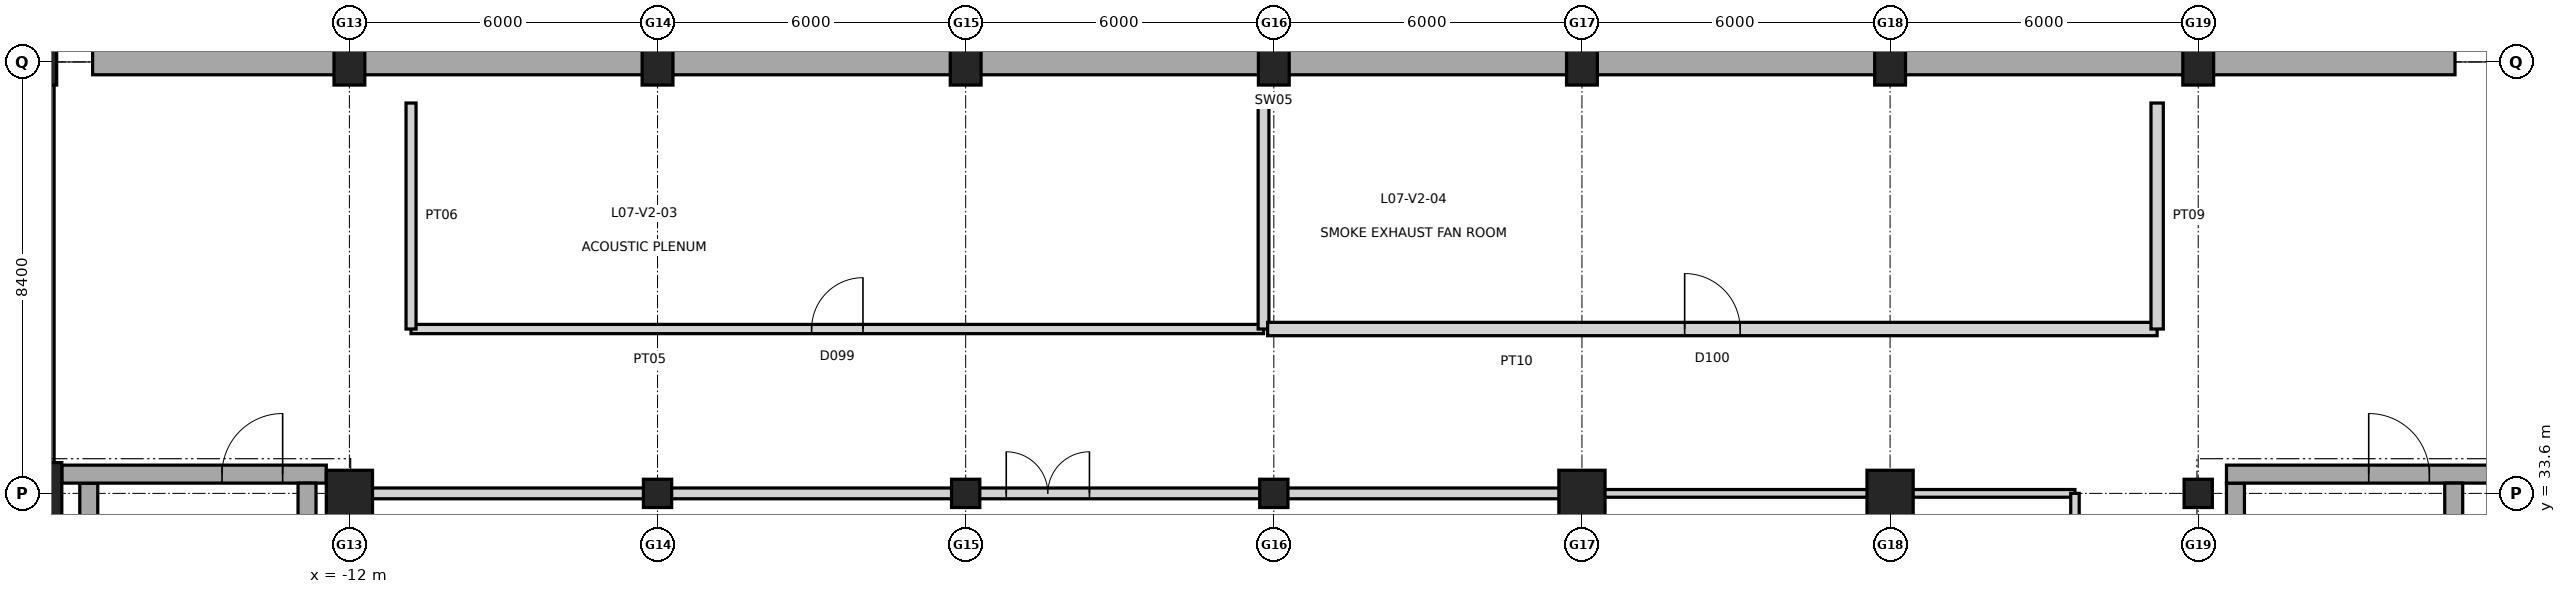
"""IFC4 building model, lengths in metres.
Left out: names, types, materials, properties, quantities, classifications, styles, units other than length and angle.
Written with IfcOpenShell. Run it as: python <this file> out.ifc"""

import sys

from ifc_helpers import new_model, si_unit, direction, frame, frame_2d, origin, origin_2d, place, context, subcontext, project, spatial, rectangle, extrude, element, fill, save


model = new_model("IFC4")
c1 = context("Model", 3, precision=1e-05, world=origin(), true_north=direction((0.0, 1.0)))
c2 = subcontext(c1, "Body", "Model", "MODEL_VIEW")
j1 = project(units=[si_unit("LENGTHUNIT", "METRE"), si_unit("PLANEANGLEUNIT", "RADIAN")], contexts=[c1])
p1 = place(None, origin())
s1 = spatial("IfcSite", under=j1, at=p1, CompositionType="ELEMENT")
p2 = place(p1, origin())
s2 = spatial("IfcBuilding", under=s1, at=p2, CompositionType="ELEMENT")
p3 = place(p2, frame((0.0, 0.0, 36.0)))
s3 = spatial("IfcBuildingStorey", under=s2, at=p3, CompositionType="ELEMENT", Elevation=36.0)
p4 = place(p3, frame((-18.0, 33.6, 0.0), z_axis=(0.0, 0.0, 1.0), x_axis=(1.0, 0.0, 0.0)))
e1 = element("IfcColumn", 1, at=p4, inside=s3, PredefinedType="COLUMN", context=c2, shape_type="SweptSolid", body=[
    extrude(rectangle(XDim=0.8, YDim=1.2, at=origin_2d()), origin(), (0.0, 0.0, 1.0), 5.4),
])
p5 = place(p3, frame((-18.0, 42.0, 0.0), z_axis=(0.0, 0.0, 1.0), x_axis=(1.0, 0.0, 0.0)))
e2 = element("IfcColumn", 2, at=p5, inside=s3, PredefinedType="COLUMN", context=c2, shape_type="SweptSolid", body=[
    extrude(rectangle(XDim=0.6, YDim=0.9, at=origin_2d()), origin(), (0.0, 0.0, 1.0), 5.4),
])
p6 = place(p3, frame((-12.0, 33.6, 0.0), z_axis=(0.0, 0.0, 1.0), x_axis=(1.0, 0.0, 0.0)))
e3 = element("IfcColumn", 3, at=p6, inside=s3, PredefinedType="COLUMN", context=c2, shape_type="SweptSolid", body=[
    extrude(rectangle(XDim=0.9, YDim=0.9, at=origin_2d()), origin(), (0.0, 0.0, 1.0), 5.4),
])
p7 = place(p3, frame((-12.0, 42.0, 0.0), z_axis=(0.0, 0.0, 1.0), x_axis=(1.0, 0.0, 0.0)))
e4 = element("IfcColumn", 4, at=p7, inside=s3, PredefinedType="COLUMN", context=c2, shape_type="SweptSolid", body=[
    extrude(rectangle(XDim=0.6, YDim=0.9, at=origin_2d()), origin(), (0.0, 0.0, 1.0), 5.4),
])
p8 = place(p3, frame((-6.0, 33.6, 0.0), z_axis=(0.0, 0.0, 1.0), x_axis=(1.0, 0.0, 0.0)))
e5 = element("IfcColumn", 5, at=p8, inside=s3, PredefinedType="COLUMN", context=c2, shape_type="SweptSolid", body=[
    extrude(rectangle(XDim=0.55, YDim=0.55, at=origin_2d()), origin(), (0.0, 0.0, 1.0), 5.4),
])
p9 = place(p3, frame((-6.0, 42.0, 0.0), z_axis=(0.0, 0.0, 1.0), x_axis=(1.0, 0.0, 0.0)))
e6 = element("IfcColumn", 6, at=p9, inside=s3, PredefinedType="COLUMN", context=c2, shape_type="SweptSolid", body=[
    extrude(rectangle(XDim=0.6, YDim=0.9, at=origin_2d()), origin(), (0.0, 0.0, 1.0), 5.4),
])
p10 = place(p3, frame((0.0, 33.6, 0.0), z_axis=(0.0, 0.0, 1.0), x_axis=(1.0, 0.0, 0.0)))
e7 = element("IfcColumn", 7, at=p10, inside=s3, PredefinedType="COLUMN", context=c2, shape_type="SweptSolid", body=[
    extrude(rectangle(XDim=0.55, YDim=0.55, at=origin_2d()), origin(), (0.0, 0.0, 1.0), 5.4),
])
p11 = place(p3, frame((0.0, 42.0, 0.0), z_axis=(0.0, 0.0, 1.0), x_axis=(1.0, 0.0, 0.0)))
e8 = element("IfcColumn", 8, at=p11, inside=s3, PredefinedType="COLUMN", context=c2, shape_type="SweptSolid", body=[
    extrude(rectangle(XDim=0.6, YDim=0.9, at=origin_2d()), origin(), (0.0, 0.0, 1.0), 5.4),
])
p12 = place(p3, frame((6.0, 33.6, 0.0), z_axis=(0.0, 0.0, 1.0), x_axis=(1.0, 0.0, 0.0)))
e9 = element("IfcColumn", 9, at=p12, inside=s3, PredefinedType="COLUMN", context=c2, shape_type="SweptSolid", body=[
    extrude(rectangle(XDim=0.55, YDim=0.55, at=origin_2d()), origin(), (0.0, 0.0, 1.0), 5.4),
])
p13 = place(p3, frame((6.0, 42.0, 0.0), z_axis=(0.0, 0.0, 1.0), x_axis=(1.0, 0.0, 0.0)))
e10 = element("IfcColumn", 10, at=p13, inside=s3, PredefinedType="COLUMN", context=c2, shape_type="SweptSolid", body=[
    extrude(rectangle(XDim=0.6, YDim=0.9, at=origin_2d()), origin(), (0.0, 0.0, 1.0), 5.4),
])
p14 = place(p3, frame((12.0, 33.6, 0.0), z_axis=(0.0, 0.0, 1.0), x_axis=(1.0, 0.0, 0.0)))
e11 = element("IfcColumn", 11, at=p14, inside=s3, PredefinedType="COLUMN", context=c2, shape_type="SweptSolid", body=[
    extrude(rectangle(XDim=0.9, YDim=0.9, at=origin_2d()), origin(), (0.0, 0.0, 1.0), 5.4),
])
p15 = place(p3, frame((12.0, 42.0, 0.0), z_axis=(0.0, 0.0, 1.0), x_axis=(1.0, 0.0, 0.0)))
e12 = element("IfcColumn", 12, at=p15, inside=s3, PredefinedType="COLUMN", context=c2, shape_type="SweptSolid", body=[
    extrude(rectangle(XDim=0.6, YDim=0.9, at=origin_2d()), origin(), (0.0, 0.0, 1.0), 5.4),
])
p16 = place(p3, frame((18.0, 33.6, 0.0), z_axis=(0.0, 0.0, 1.0), x_axis=(1.0, 0.0, 0.0)))
e13 = element("IfcColumn", 13, at=p16, inside=s3, PredefinedType="COLUMN", context=c2, shape_type="SweptSolid", body=[
    extrude(rectangle(XDim=0.9, YDim=0.9, at=origin_2d()), origin(), (0.0, 0.0, 1.0), 5.4),
])
p17 = place(p3, frame((18.0, 42.0, 0.0), z_axis=(0.0, 0.0, 1.0), x_axis=(1.0, 0.0, 0.0)))
e14 = element("IfcColumn", 14, at=p17, inside=s3, PredefinedType="COLUMN", context=c2, shape_type="SweptSolid", body=[
    extrude(rectangle(XDim=0.6, YDim=0.9, at=origin_2d()), origin(), (0.0, 0.0, 1.0), 5.4),
])
p18 = place(p3, frame((24.0, 33.6, 0.0), z_axis=(0.0, 0.0, 1.0), x_axis=(1.0, 0.0, 0.0)))
e15 = element("IfcColumn", 15, at=p18, inside=s3, PredefinedType="COLUMN", context=c2, shape_type="SweptSolid", body=[
    extrude(rectangle(XDim=0.55, YDim=0.55, at=origin_2d()), origin(), (0.0, 0.0, 1.0), 5.4),
])
p19 = place(p3, frame((24.0, 42.0, 0.0), z_axis=(0.0, 0.0, 1.0), x_axis=(1.0, 0.0, 0.0)))
e16 = element("IfcColumn", 16, at=p19, inside=s3, PredefinedType="COLUMN", context=c2, shape_type="SweptSolid", body=[
    extrude(rectangle(XDim=0.6, YDim=0.9, at=origin_2d()), origin(), (0.0, 0.0, 1.0), 5.4),
])
p20 = place(p3, frame((-18.0, 18.0, 0.0), z_axis=(0.0, 0.0, 1.0), x_axis=(0.0, 1.0, 0.0)))
e17 = element("IfcWall", 17, at=p20, inside=s3, PredefinedType="SHEAR", context=c2, shape_type="SweptSolid", body=[
    extrude(rectangle(XDim=23.55, YDim=0.5, at=frame_2d((11.775, 0.0))), origin(), (0.0, 0.0, 1.0), 5.4),
])
p21 = place(p3, frame((-17.0, 42.0, 0.0), z_axis=(0.0, 0.0, 1.0), x_axis=(1.0, 0.0, 0.0)))
e18 = element("IfcWall", 18, at=p21, inside=s3, PredefinedType="SHEAR", context=c2, shape_type="SweptSolid", body=[
    extrude(rectangle(XDim=46.0, YDim=0.5, at=frame_2d((23.0, 0.0))), origin(), (0.0, 0.0, 1.0), 5.4),
])
p22 = place(p3, frame((-17.075, 25.5, 0.0), z_axis=(0.0, 0.0, 1.0), x_axis=(0.0, 1.0, 0.0)))
e19 = element("IfcWall", 19, at=p22, inside=s3, PredefinedType="SHEAR", context=c2, shape_type="SweptSolid", body=[
    extrude(rectangle(XDim=8.3, YDim=0.35, at=frame_2d((4.15, 0.0))), origin(), (0.0, 0.0, 1.0), 4.645),
])
p23 = place(p3, frame((-17.6, 33.975, 0.0), z_axis=(0.0, 0.0, 1.0), x_axis=(1.0, 0.0, 0.0)))
e20 = element("IfcWall", 20, at=p23, inside=s3, PredefinedType="SHEAR", context=c2, shape_type="SweptSolid", body=[
    extrude(rectangle(XDim=5.15, YDim=0.35, at=frame_2d((2.575, 0.0))), origin(), (0.0, 0.0, 1.0), 4.645),
])
p24 = place(p23, frame((3.12, 0.0, 0.0)))
e21 = element("IfcOpeningElement", 21, at=p24, cuts=e20, PredefinedType="OPENING", context=c2, shape_type="SweptSolid", body=[
    extrude(rectangle(XDim=1.18, YDim=2.15, at=frame_2d((0.59, 1.075))), frame((0.0, 0.185, 0.0), z_axis=(0.0, -1.0, 0.0), x_axis=(1.0, 0.0, 0.0)), (0.0, 0.0, 1.0), 0.37),
])
for number, where, z_axis, x_axis in (
    (22, (-12.825, 33.8, 0.0), (0.0, 0.0, 1.0), (0.0, -1.0, 0.0)),
    (23, (24.725, 25.5, 0.0), (0.0, 0.0, 1.0), (0.0, 1.0, 0.0)),
):
    element("IfcWall", number, at=place(p3, frame(where, z_axis=z_axis, x_axis=x_axis)), inside=s3, PredefinedType="SHEAR", context=c2, shape_type="SweptSolid", body=[
        extrude(rectangle(XDim=8.3, YDim=0.35, at=frame_2d((4.15, 0.0))), origin(), (0.0, 0.0, 1.0), 4.645),
    ])
p25 = place(p3, frame((24.55, 33.975, 0.0), z_axis=(0.0, 0.0, 1.0), x_axis=(1.0, 0.0, 0.0)))
e24 = element("IfcWall", 24, at=p25, inside=s3, PredefinedType="SHEAR", context=c2, shape_type="SweptSolid", body=[
    extrude(rectangle(XDim=5.15, YDim=0.35, at=frame_2d((2.575, 0.0))), origin(), (0.0, 0.0, 1.0), 4.645),
])
p26 = place(p25, frame((2.77, 0.0, 0.0)))
e25 = element("IfcOpeningElement", 25, at=p26, cuts=e24, PredefinedType="OPENING", context=c2, shape_type="SweptSolid", body=[
    extrude(rectangle(XDim=1.18, YDim=2.15, at=frame_2d((0.59, 1.075))), frame((0.0, 0.185, 0.0), z_axis=(0.0, -1.0, 0.0), x_axis=(1.0, 0.0, 0.0)), (0.0, 0.0, 1.0), 0.37),
])
p27 = place(p3, frame((28.975, 33.8, 0.0), z_axis=(0.0, 0.0, 1.0), x_axis=(0.0, -1.0, 0.0)))
e26 = element("IfcWall", 26, at=p27, inside=s3, PredefinedType="SHEAR", context=c2, shape_type="SweptSolid", body=[
    extrude(rectangle(XDim=8.3, YDim=0.35, at=frame_2d((4.15, 0.0))), origin(), (0.0, 0.0, 1.0), 4.645),
])
p28 = place(p3, frame((-11.8, 33.6, 0.0), z_axis=(0.0, 0.0, 1.0), x_axis=(1.0, 0.0, 0.0)))
e27 = element("IfcWall", 27, at=p28, inside=s3, PredefinedType="PARTITIONING", context=c2, shape_type="SweptSolid", body=[
    extrude(rectangle(XDim=23.6, YDim=0.21, at=frame_2d((11.8, 0.0))), origin(), (0.0, 0.0, 1.0), 5.02),
])
p29 = place(p28, frame((12.59, 0.0, 0.0)))
e28 = element("IfcOpeningElement", 28, at=p29, cuts=e27, PredefinedType="OPENING", context=c2, shape_type="SweptSolid", body=[
    extrude(rectangle(XDim=1.62, YDim=2.2, at=frame_2d((0.81, 1.1))), frame((0.0, 0.115, 0.0), z_axis=(0.0, -1.0, 0.0), x_axis=(1.0, 0.0, 0.0)), (0.0, 0.0, 1.0), 0.23),
])
p30 = place(p3, frame((-11.8, 18.2, 0.0), z_axis=(0.0, 0.0, 1.0), x_axis=(0.0, 1.0, 0.0)))
e29 = element("IfcWall", 29, at=p30, inside=s3, PredefinedType="PARTITIONING", context=c2, shape_type="SweptSolid", body=[
    extrude(rectangle(XDim=15.4, YDim=0.225, at=frame_2d((7.7, 0.0))), origin(), (0.0, 0.0, 1.0), 4.33),
])
p31 = place(p3, frame((11.8, 18.2, 0.0), z_axis=(0.0, 0.0, 1.0), x_axis=(0.0, 1.0, 0.0)))
e30 = element("IfcWall", 30, at=p31, inside=s3, PredefinedType="PARTITIONING", context=c2, shape_type="SweptSolid", body=[
    extrude(rectangle(XDim=15.4, YDim=0.21, at=frame_2d((7.7, 0.0))), origin(), (0.0, 0.0, 1.0), 4.33),
])
p32 = place(p3, frame((12.4, 33.6, 0.0), z_axis=(0.0, 0.0, 1.0), x_axis=(1.0, 0.0, 0.0)))
e31 = element("IfcWall", 31, at=p32, inside=s3, PredefinedType="PARTITIONING", context=c2, shape_type="SweptSolid", body=[
    extrude(rectangle(XDim=9.2, YDim=0.15, at=frame_2d((4.6, 0.0))), origin(), (0.0, 0.0, 1.0), 5.02),
])
p33 = place(p3, frame((21.6, 24.2, 0.0), z_axis=(0.0, 0.0, 1.0), x_axis=(0.0, 1.0, 0.0)))
e32 = element("IfcWall", 32, at=p33, inside=s3, PredefinedType="PARTITIONING", context=c2, shape_type="SweptSolid", body=[
    extrude(rectangle(XDim=9.4, YDim=0.165, at=frame_2d((4.7, 0.0))), origin(), (0.0, 0.0, 1.0), 5.02),
])
p34 = place(p3, frame((-10.8, 36.8, 0.0), z_axis=(0.0, 0.0, 1.0), x_axis=(1.0, 0.0, 0.0)))
e33 = element("IfcWall", 33, at=p34, inside=s3, PredefinedType="PARTITIONING", context=c2, shape_type="SweptSolid", body=[
    extrude(rectangle(XDim=16.6, YDim=0.18, at=frame_2d((8.3, 0.0))), origin(), (0.0, 0.0, 1.0), 5.02),
])
p35 = place(p34, frame((7.8, 0.0, 0.0)))
e34 = element("IfcOpeningElement", 34, at=p35, cuts=e33, PredefinedType="OPENING", context=c2, shape_type="SweptSolid", body=[
    extrude(rectangle(XDim=1.0, YDim=2.25, at=frame_2d((0.5, 1.125))), frame((0.0, 0.1, 0.0), z_axis=(0.0, -1.0, 0.0), x_axis=(1.0, 0.0, 0.0)), (0.0, 0.0, 1.0), 0.2),
])
p36 = place(p3, frame((-10.8, 36.8, 0.0), z_axis=(0.0, 0.0, 1.0), x_axis=(0.0, 1.0, 0.0)))
e35 = element("IfcWall", 35, at=p36, inside=s3, PredefinedType="PARTITIONING", context=c2, shape_type="SweptSolid", body=[
    extrude(rectangle(XDim=4.4, YDim=0.195, at=frame_2d((2.2, 0.0))), origin(), (0.0, 0.0, 1.0), 5.02),
])
p37 = place(p3, frame((5.8, 36.8, 0.0), z_axis=(0.0, 0.0, 1.0), x_axis=(0.0, 1.0, 0.0)))
e36 = element("IfcWall", 36, at=p37, inside=s3, PredefinedType="PARTITIONING", context=c2, shape_type="SweptSolid", body=[
    extrude(rectangle(XDim=4.4, YDim=0.21, at=frame_2d((2.2, 0.0))), origin(), (0.0, 0.0, 1.0), 4.33),
])
p38 = place(p3, frame((5.88, 36.8, 0.0), z_axis=(0.0, 0.0, 1.0), x_axis=(1.0, 0.0, 0.0)))
e37 = element("IfcWall", 37, at=p38, inside=s3, PredefinedType="PARTITIONING", context=c2, shape_type="SweptSolid", body=[
    extrude(rectangle(XDim=17.32, YDim=0.26, at=frame_2d((8.66, 0.0))), origin(), (0.0, 0.0, 1.0), 5.02),
])
p39 = place(p38, frame((8.12, 0.0, 0.0)))
e38 = element("IfcOpeningElement", 38, at=p39, cuts=e37, PredefinedType="OPENING", context=c2, shape_type="SweptSolid", body=[
    extrude(rectangle(XDim=1.08, YDim=2.25, at=frame_2d((0.54, 1.125))), frame((0.0, 0.14, 0.0), z_axis=(0.0, -1.0, 0.0), x_axis=(1.0, 0.0, 0.0)), (0.0, 0.0, 1.0), 0.28),
])
p40 = place(p3, frame((23.2, 36.8, 0.0), z_axis=(0.0, 0.0, 1.0), x_axis=(0.0, 1.0, 0.0)))
e39 = element("IfcWall", 39, at=p40, inside=s3, PredefinedType="PARTITIONING", context=c2, shape_type="SweptSolid", body=[
    extrude(rectangle(XDim=4.4, YDim=0.24, at=frame_2d((2.2, 0.0))), origin(), (0.0, 0.0, 1.0), 5.02),
])
p41 = place(p24, origin())
e40 = element("IfcDoor", 40, at=p41, inside=s3, OperationType="SINGLE_SWING_RIGHT", PredefinedType="DOOR", context=c2, shape_type="SweptSolid", body=[
    extrude(rectangle(XDim=1.18, YDim=2.15, at=frame_2d((0.59, 1.075))), frame((0.0, 0.025, 0.0), z_axis=(0.0, -1.0, 0.0), x_axis=(1.0, 0.0, 0.0)), (0.0, 0.0, 1.0), 0.05),
])
fill(e21, e40)
p42 = place(p26, origin())
e41 = element("IfcDoor", 41, at=p42, inside=s3, OperationType="SINGLE_SWING_LEFT", PredefinedType="DOOR", context=c2, shape_type="SweptSolid", body=[
    extrude(rectangle(XDim=1.18, YDim=2.15, at=frame_2d((0.59, 1.075))), frame((0.0, 0.025, 0.0), z_axis=(0.0, -1.0, 0.0), x_axis=(1.0, 0.0, 0.0)), (0.0, 0.0, 1.0), 0.05),
])
fill(e25, e41)
p43 = place(p29, origin())
e42 = element("IfcDoor", 42, at=p43, inside=s3, OperationType="DOUBLE_DOOR_SINGLE_SWING", PredefinedType="DOOR", context=c2, shape_type="SweptSolid", body=[
    extrude(rectangle(XDim=1.62, YDim=2.2, at=frame_2d((0.81, 1.1))), frame((0.0, 0.025, 0.0), z_axis=(0.0, -1.0, 0.0), x_axis=(1.0, 0.0, 0.0)), (0.0, 0.0, 1.0), 0.05),
])
fill(e28, e42)
p44 = place(p35, origin())
e43 = element("IfcDoor", 43, at=p44, inside=s3, OperationType="SINGLE_SWING_RIGHT", PredefinedType="DOOR", context=c2, shape_type="SweptSolid", body=[
    extrude(rectangle(XDim=1.0, YDim=2.25, at=frame_2d((0.5, 1.125))), frame((0.0, 0.025, 0.0), z_axis=(0.0, -1.0, 0.0), x_axis=(1.0, 0.0, 0.0)), (0.0, 0.0, 1.0), 0.05),
])
fill(e34, e43)
p45 = place(p39, origin())
e44 = element("IfcDoor", 44, at=p45, inside=s3, OperationType="SINGLE_SWING_LEFT", PredefinedType="DOOR", context=c2, shape_type="SweptSolid", body=[
    extrude(rectangle(XDim=1.08, YDim=2.25, at=frame_2d((0.54, 1.125))), frame((0.0, 0.025, 0.0), z_axis=(0.0, -1.0, 0.0), x_axis=(1.0, 0.0, 0.0)), (0.0, 0.0, 1.0), 0.05),
])
fill(e38, e44)
save(model, sys.argv[1])
